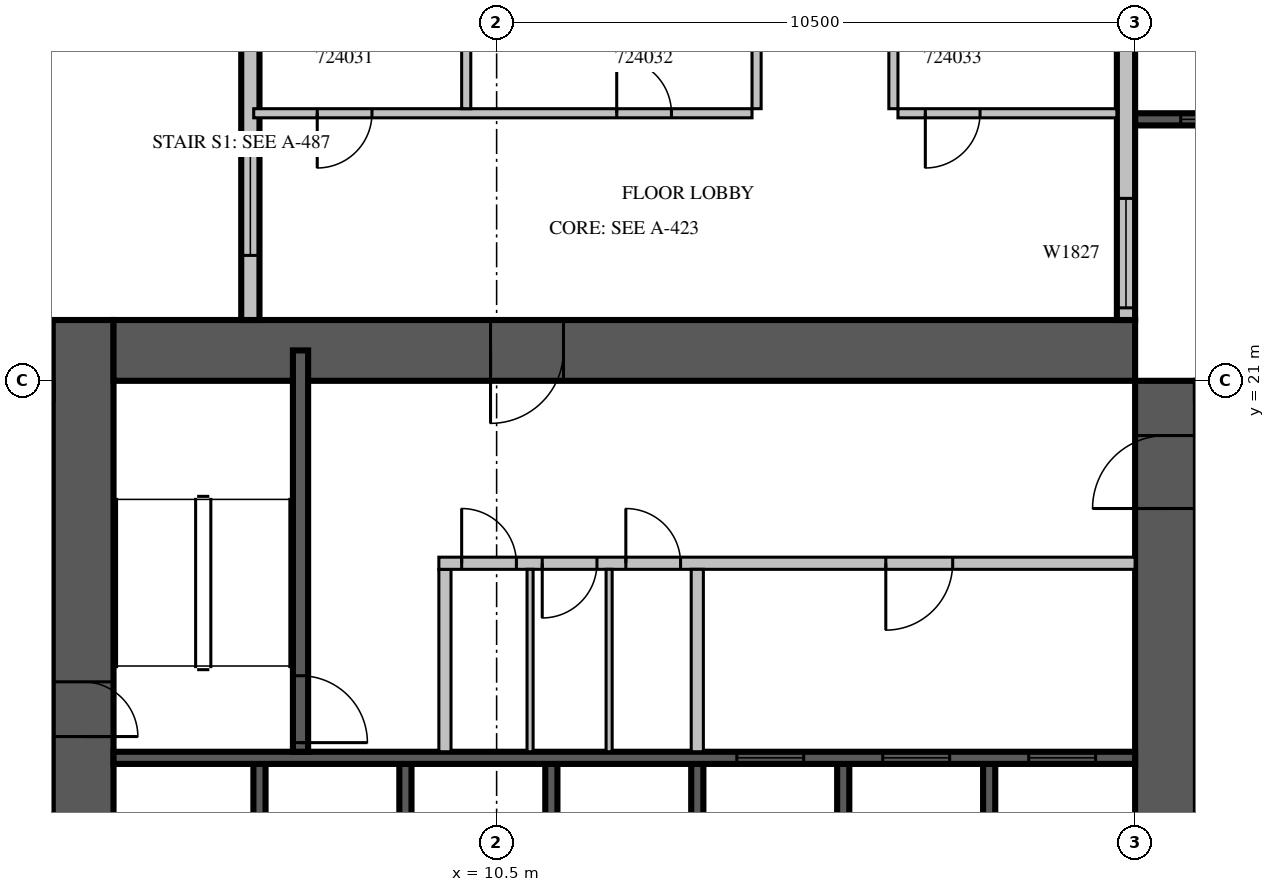
"""IFC4 building model, lengths in metres.
Left out: names, types, materials, properties, quantities, classifications, styles, units other than length and angle.
Written with IfcOpenShell. Run it as: python <this file> out.ifc"""

import sys

from ifc_helpers import new_model, si_unit, direction, frame, frame_2d, origin, place, context, subcontext, project, spatial, rectangle, extrude, source, transform, mapped, element, fill, save


model = new_model("IFC4")
c1 = context("Model", 3, precision=1e-05, world=origin(), true_north=direction((0.0, 1.0)))
c2 = subcontext(c1, "Body", "Model", "MODEL_VIEW")
j1 = project(units=[si_unit("LENGTHUNIT", "METRE"), si_unit("PLANEANGLEUNIT", "RADIAN")], contexts=[c1])
p1 = place(None, origin())
s1 = spatial("IfcSite", under=j1, at=p1, CompositionType="ELEMENT")
p2 = place(p1, origin())
s2 = spatial("IfcBuilding", under=s1, at=p2, CompositionType="ELEMENT")
p3 = place(p2, frame((0.0, 0.0, 111.9)))
s3 = spatial("IfcBuildingStorey", under=s2, at=p3, CompositionType="ELEMENT", Elevation=111.9)
m1 = source(origin(), c2, "Body", "SweptSolid", [
    extrude(rectangle(XDim=17.8, YDim=1.0, at=frame_2d((8.9, 0.0))), origin(), (0.0, 0.0, 1.0), 4.2),
])
p4 = place(p3, frame((3.7, 4.2, 0.0), z_axis=(0.0, 0.0, 1.0), x_axis=(0.0, 1.0, 0.0)))
e1 = element("IfcWall", 1, at=p4, inside=s3, PredefinedType="SHEAR", context=c2, shape_type="MappedRepresentation", body=[
    mapped(m1, transform((0.0, 0.0, 0.0), scale=1.0)),
])
m2 = source(origin(), c2, "Body", "SweptSolid", [
    extrude(rectangle(XDim=2.2, YDim=2.1, at=frame_2d((1.1, 1.05))), frame((0.0, 0.51, 0.0), z_axis=(0.0, -1.0, 0.0), x_axis=(1.0, 0.0, 0.0)), (0.0, 0.0, 1.0), 1.02),
])
p5 = place(p4, frame((4.2, 0.0, 0.0)))
e2 = element("IfcOpeningElement", 2, at=p5, cuts=e1, PredefinedType="OPENING", context=c2, shape_type="MappedRepresentation", body=[
    mapped(m2, transform((0.0, 0.0, 0.0), scale=1.0)),
])
m3 = source(origin(), c2, "Body", "SweptSolid", [
    extrude(rectangle(XDim=0.9, YDim=2.1, at=frame_2d((0.45, 1.05))), frame((0.0, 0.51, 0.0), z_axis=(0.0, -1.0, 0.0), x_axis=(1.0, 0.0, 0.0)), (0.0, 0.0, 1.0), 1.02),
])
p6 = place(p4, frame((10.95, 0.0, 0.0)))
e3 = element("IfcOpeningElement", 3, at=p6, cuts=e1, PredefinedType="OPENING", context=c2, shape_type="MappedRepresentation", body=[
    mapped(m3, transform((0.0, 0.0, 0.0), scale=1.0)),
])
m4 = source(origin(), c2, "Body", "SweptSolid", [
    extrude(rectangle(XDim=16.8, YDim=1.0, at=frame_2d((8.4, 0.0))), origin(), (0.0, 0.0, 1.0), 4.2),
])
p7 = place(p3, frame((21.5, 4.2, 0.0), z_axis=(0.0, 0.0, 1.0), x_axis=(0.0, 1.0, 0.0)))
e4 = element("IfcWall", 4, at=p7, inside=s3, PredefinedType="SHEAR", context=c2, shape_type="MappedRepresentation", body=[
    mapped(m4, transform((0.0, 0.0, 0.0), scale=1.0)),
])
p8 = place(p7, frame((4.2, 0.0, 0.0)))
e5 = element("IfcOpeningElement", 5, at=p8, cuts=e4, PredefinedType="OPENING", context=c2, shape_type="MappedRepresentation", body=[
    mapped(m2, transform((0.0, 0.0, 0.0), scale=1.0)),
])
m5 = source(origin(), c2, "Body", "SweptSolid", [
    extrude(rectangle(XDim=1.2, YDim=2.1, at=frame_2d((0.6, 1.05))), frame((0.0, 0.51, 0.0), z_axis=(0.0, -1.0, 0.0), x_axis=(1.0, 0.0, 0.0)), (0.0, 0.0, 1.0), 1.02),
])
p9 = place(p7, frame((14.7, 0.0, 0.0)))
e6 = element("IfcOpeningElement", 6, at=p9, cuts=e4, PredefinedType="OPENING", context=c2, shape_type="MappedRepresentation", body=[
    mapped(m5, transform((0.0, 0.0, 0.0), scale=1.0)),
])
p10 = place(p3, frame((4.2, 21.5, 0.0), z_axis=(0.0, 0.0, 1.0), x_axis=(1.0, 0.0, 0.0)))
e7 = element("IfcWall", 7, at=p10, inside=s3, PredefinedType="SHEAR", context=c2, shape_type="MappedRepresentation", body=[
    mapped(m4, transform((0.0, 0.0, 0.0), scale=1.0)),
])
p11 = place(p10, frame((6.2, 0.0, 0.0)))
e8 = element("IfcOpeningElement", 8, at=p11, cuts=e7, PredefinedType="OPENING", context=c2, shape_type="MappedRepresentation", body=[
    mapped(m5, transform((0.0, 0.0, 0.0), scale=1.0)),
])
m6 = source(origin(), c2, "Body", "SweptSolid", [
    extrude(rectangle(XDim=3.9, YDim=0.2, at=frame_2d((1.95, 0.0))), origin(), (0.0, 0.0, 1.0), 3.8),
])
p12 = place(p3, frame((21.0, 25.3, 0.0), z_axis=(0.0, 0.0, 1.0), x_axis=(1.0, 0.0, 0.0)))
e9 = element("IfcWall", 9, at=p12, inside=s3, PredefinedType="SOLIDWALL", context=c2, shape_type="MappedRepresentation", body=[
    mapped(m6, transform((0.0, 0.0, 0.0), scale=1.0)),
])
m7 = source(origin(), c2, "Body", "SweptSolid", [
    extrude(rectangle(XDim=2.4, YDim=2.7, at=frame_2d((1.2, 1.35))), frame((0.0, 0.11, 0.0), z_axis=(0.0, -1.0, 0.0), x_axis=(1.0, 0.0, 0.0)), (0.0, 0.0, 1.0), 0.22),
])
p13 = place(p12, frame((0.75, 0.0, 0.6)))
e10 = element("IfcOpeningElement", 10, at=p13, cuts=e9, PredefinedType="OPENING", context=c2, shape_type="MappedRepresentation", body=[
    mapped(m7, transform((0.0, 0.0, 0.0), scale=1.0)),
])
m8 = source(origin(), c2, "Body", "SweptSolid", [
    extrude(rectangle(XDim=6.875, YDim=0.3, at=frame_2d((3.438, 0.0))), origin(), (0.0, 0.0, 1.0), 3.8),
])
p14 = place(p3, frame((20.85, 22.0, 0.0), z_axis=(0.0, 0.0, 1.0), x_axis=(0.0, 1.0, 0.0)))
e11 = element("IfcWall", 11, at=p14, inside=s3, PredefinedType="STANDARD", context=c2, shape_type="MappedRepresentation", body=[
    mapped(m8, transform((0.0, 0.0, 0.0), scale=1.0)),
])
m9 = source(origin(), c2, "Body", "SweptSolid", [
    extrude(rectangle(XDim=1.8, YDim=2.7, at=frame_2d((0.9, 1.35))), frame((0.0, 0.16, 0.0), z_axis=(0.0, -1.0, 0.0), x_axis=(1.0, 0.0, 0.0)), (0.0, 0.0, 1.0), 0.32),
])
p15 = place(p14, frame((0.2, 0.0, 0.6)))
e12 = element("IfcOpeningElement", 12, at=p15, cuts=e11, PredefinedType="OPENING", context=c2, shape_type="MappedRepresentation", body=[
    mapped(m9, transform((0.0, 0.0, 0.0), scale=1.0)),
])
m10 = source(origin(), c2, "Body", "SweptSolid", [
    extrude(rectangle(XDim=1.0, YDim=2.1, at=frame_2d((0.5, 1.05))), frame((0.0, 0.16, 0.0), z_axis=(0.0, -1.0, 0.0), x_axis=(1.0, 0.0, 0.0)), (0.0, 0.0, 1.0), 0.32),
])
p16 = place(p14, frame((4.8, 0.0, 0.0)))
e13 = element("IfcOpeningElement", 13, at=p16, cuts=e11, PredefinedType="OPENING", context=c2, shape_type="MappedRepresentation", body=[
    mapped(m10, transform((0.0, 0.0, 0.0), scale=1.0)),
])
m11 = source(origin(), c2, "Body", "SweptSolid", [
    extrude(rectangle(XDim=16.4, YDim=0.3, at=frame_2d((8.2, 0.0))), origin(), (0.0, 0.0, 1.0), 3.8),
])
p17 = place(p3, frame((6.45, 38.4, 0.0), z_axis=(0.0, 0.0, 1.0), x_axis=(0.0, -1.0, 0.0)))
e14 = element("IfcWall", 14, at=p17, inside=s3, PredefinedType="STANDARD", context=c2, shape_type="MappedRepresentation", body=[
    mapped(m11, transform((0.0, 0.0, 0.0), scale=1.0)),
])
p18 = place(p17, frame((1.15, 0.0, 0.6)))
e15 = element("IfcOpeningElement", 15, at=p18, cuts=e14, PredefinedType="OPENING", context=c2, shape_type="MappedRepresentation", body=[
    mapped(m9, transform((0.0, 0.0, 0.0), scale=1.0)),
])
p19 = place(p17, frame((9.438, 0.0, 0.6)))
e16 = element("IfcOpeningElement", 16, at=p19, cuts=e14, PredefinedType="OPENING", context=c2, shape_type="MappedRepresentation", body=[
    mapped(m9, transform((0.0, 0.0, 0.0), scale=1.0)),
])
p20 = place(p17, frame((13.537, 0.0, 0.6)))
e17 = element("IfcOpeningElement", 17, at=p20, cuts=e14, PredefinedType="OPENING", context=c2, shape_type="MappedRepresentation", body=[
    mapped(m9, transform((0.0, 0.0, 0.0), scale=1.0)),
])
p21 = place(p17, frame((5.908, 0.0, 0.0)))
e18 = element("IfcOpeningElement", 18, at=p21, cuts=e14, PredefinedType="OPENING", context=c2, shape_type="MappedRepresentation", body=[
    mapped(m10, transform((0.0, 0.0, 0.0), scale=1.0)),
])
m12 = source(origin(), c2, "Body", "SweptSolid", [
    extrude(rectangle(XDim=3.0, YDim=0.2, at=frame_2d((1.5, 0.0))), origin(), (0.0, 0.0, 1.0), 4.2),
])
for number, where, z_axis, x_axis in (
    (19, (6.6, 11.7, 0.0), (0.0, 0.0, 1.0), (0.0, 1.0, 0.0)),
    (20, (9.0, 11.7, 0.0), (0.0, 0.0, 1.0), (0.0, 1.0, 0.0)),
    (21, (11.4, 11.7, 0.0), (0.0, 0.0, 1.0), (0.0, 1.0, 0.0)),
    (22, (13.8, 11.7, 0.0), (0.0, 0.0, 1.0), (0.0, 1.0, 0.0)),
    (23, (16.2, 11.7, 0.0), (0.0, 0.0, 1.0), (0.0, 1.0, 0.0)),
    (24, (18.6, 11.7, 0.0), (0.0, 0.0, 1.0), (0.0, 1.0, 0.0)),
):
    element("IfcWall", number, at=place(p3, frame(where, z_axis=z_axis, x_axis=x_axis)), inside=s3, PredefinedType="SOLIDWALL", context=c2, shape_type="MappedRepresentation", body=[
        mapped(m12, transform((0.0, 0.0, 0.0), scale=1.0)),
    ])
m13 = source(origin(), c2, "Body", "SweptSolid", [
    extrude(rectangle(XDim=16.8, YDim=0.2, at=frame_2d((8.4, 0.0))), origin(), (0.0, 0.0, 1.0), 4.2),
])
p22 = place(p3, frame((4.2, 14.8, 0.0), z_axis=(0.0, 0.0, 1.0), x_axis=(1.0, 0.0, 0.0)))
e25 = element("IfcWall", 25, at=p22, inside=s3, PredefinedType="SOLIDWALL", context=c2, shape_type="MappedRepresentation", body=[
    mapped(m13, transform((0.0, 0.0, 0.0), scale=1.0)),
])
m14 = source(origin(), c2, "Body", "SweptSolid", [
    extrude(rectangle(XDim=1.1, YDim=2.1, at=frame_2d((0.55, 1.05))), frame((0.0, 0.11, 0.0), z_axis=(0.0, -1.0, 0.0), x_axis=(1.0, 0.0, 0.0)), (0.0, 0.0, 1.0), 0.22),
])
p23 = place(p22, frame((10.25, 0.0, 0.0)))
e26 = element("IfcOpeningElement", 26, at=p23, cuts=e25, PredefinedType="OPENING", context=c2, shape_type="MappedRepresentation", body=[
    mapped(m14, transform((0.0, 0.0, 0.0), scale=1.0)),
])
p24 = place(p22, frame((12.65, 0.0, 0.0)))
e27 = element("IfcOpeningElement", 27, at=p24, cuts=e25, PredefinedType="OPENING", context=c2, shape_type="MappedRepresentation", body=[
    mapped(m14, transform((0.0, 0.0, 0.0), scale=1.0)),
])
p25 = place(p22, frame((15.05, 0.0, 0.0)))
e28 = element("IfcOpeningElement", 28, at=p25, cuts=e25, PredefinedType="OPENING", context=c2, shape_type="MappedRepresentation", body=[
    mapped(m14, transform((0.0, 0.0, 0.0), scale=1.0)),
])
m15 = source(origin(), c2, "Body", "SweptSolid", [
    extrude(rectangle(XDim=6.6, YDim=0.25, at=frame_2d((3.3, 0.0))), origin(), (0.0, 0.0, 1.0), 3.8),
])
p26 = place(p3, frame((7.275, 14.9, 0.0), z_axis=(0.0, 0.0, 1.0), x_axis=(0.0, 1.0, 0.0)))
e29 = element("IfcWall", 29, at=p26, inside=s3, PredefinedType="SOLIDWALL", context=c2, shape_type="MappedRepresentation", body=[
    mapped(m15, transform((0.0, 0.0, 0.0), scale=1.0)),
])
m16 = source(origin(), c2, "Body", "SweptSolid", [
    extrude(rectangle(XDim=1.1, YDim=2.1, at=frame_2d((0.55, 1.05))), frame((0.0, 0.135, 0.0), z_axis=(0.0, -1.0, 0.0), x_axis=(1.0, 0.0, 0.0)), (0.0, 0.0, 1.0), 0.27),
])
p27 = place(p26, frame((0.15, 0.0, 0.0)))
e30 = element("IfcOpeningElement", 30, at=p27, cuts=e29, PredefinedType="OPENING", context=c2, shape_type="MappedRepresentation", body=[
    mapped(m16, transform((0.0, 0.0, 0.0), scale=1.0)),
])
m17 = source(origin(), c2, "Body", "SweptSolid", [
    extrude(rectangle(XDim=3.0, YDim=0.2, at=frame_2d((1.5, 0.0))), origin(), (0.0, 0.0, 1.0), 3.8),
])
p28 = place(p3, frame((9.65, 14.9, 0.0), z_axis=(0.0, 0.0, 1.0), x_axis=(0.0, 1.0, 0.0)))
e31 = element("IfcWall", 31, at=p28, inside=s3, PredefinedType="PARTITIONING", context=c2, shape_type="MappedRepresentation", body=[
    mapped(m17, transform((0.0, 0.0, 0.0), scale=1.0)),
])
m18 = source(origin(), c2, "Body", "SweptSolid", [
    extrude(rectangle(XDim=11.45, YDim=0.2, at=frame_2d((5.725, 0.0))), origin(), (0.0, 0.0, 1.0), 3.8),
])
p29 = place(p3, frame((9.55, 18.0, 0.0), z_axis=(0.0, 0.0, 1.0), x_axis=(1.0, 0.0, 0.0)))
e32 = element("IfcWall", 32, at=p29, inside=s3, PredefinedType="PARTITIONING", context=c2, shape_type="MappedRepresentation", body=[
    mapped(m18, transform((0.0, 0.0, 0.0), scale=1.0)),
])
m19 = source(origin(), c2, "Body", "SweptSolid", [
    extrude(rectangle(XDim=0.9, YDim=2.1, at=frame_2d((0.45, 1.05))), frame((0.0, 0.11, 0.0), z_axis=(0.0, -1.0, 0.0), x_axis=(1.0, 0.0, 0.0)), (0.0, 0.0, 1.0), 0.22),
])
p30 = place(p29, frame((0.375, 0.0, 0.0)))
e33 = element("IfcOpeningElement", 33, at=p30, cuts=e32, PredefinedType="OPENING", context=c2, shape_type="MappedRepresentation", body=[
    mapped(m19, transform((0.0, 0.0, 0.0), scale=1.0)),
])
p31 = place(p29, frame((1.7, 0.0, 0.0)))
e34 = element("IfcOpeningElement", 34, at=p31, cuts=e32, PredefinedType="OPENING", context=c2, shape_type="MappedRepresentation", body=[
    mapped(m19, transform((0.0, 0.0, 0.0), scale=1.0)),
])
p32 = place(p29, frame((3.075, 0.0, 0.0)))
e35 = element("IfcOpeningElement", 35, at=p32, cuts=e32, PredefinedType="OPENING", context=c2, shape_type="MappedRepresentation", body=[
    mapped(m19, transform((0.0, 0.0, 0.0), scale=1.0)),
])
p33 = place(p29, frame((7.35, 0.0, 0.0)))
e36 = element("IfcOpeningElement", 36, at=p33, cuts=e32, PredefinedType="OPENING", context=c2, shape_type="MappedRepresentation", body=[
    mapped(m14, transform((0.0, 0.0, 0.0), scale=1.0)),
])
p34 = place(p3, frame((13.8, 14.9, 0.0), z_axis=(0.0, 0.0, 1.0), x_axis=(0.0, 1.0, 0.0)))
e37 = element("IfcWall", 37, at=p34, inside=s3, PredefinedType="PARTITIONING", context=c2, shape_type="MappedRepresentation", body=[
    mapped(m17, transform((0.0, 0.0, 0.0), scale=1.0)),
])
m20 = source(origin(), c2, "Body", "SweptSolid", [
    extrude(rectangle(XDim=3.0, YDim=0.1, at=frame_2d((1.5, 0.0))), origin(), (0.0, 0.0, 1.0), 3.8),
])
for number, where, z_axis, x_axis in (
    (38, (11.05, 14.9, 0.0), (0.0, 0.0, 1.0), (0.0, 1.0, 0.0)),
    (39, (12.35, 14.9, 0.0), (0.0, 0.0, 1.0), (0.0, 1.0, 0.0)),
):
    element("IfcWall", number, at=place(p3, frame(where, z_axis=z_axis, x_axis=x_axis)), inside=s3, PredefinedType="PARTITIONING", context=c2, shape_type="MappedRepresentation", body=[
        mapped(m20, transform((0.0, 0.0, 0.0), scale=1.0)),
    ])
m21 = source(origin(), c2, "Body", "SweptSolid", [
    extrude(rectangle(XDim=8.195, YDim=0.15, at=frame_2d((4.098, 0.0))), origin(), (0.0, 0.0, 1.0), 3.8),
])
p35 = place(p3, frame((6.505, 25.4, 0.0), z_axis=(0.0, 0.0, 1.0), x_axis=(1.0, 0.0, 0.0)))
e40 = element("IfcWall", 40, at=p35, inside=s3, PredefinedType="PARTITIONING", context=c2, shape_type="MappedRepresentation", body=[
    mapped(m21, transform((0.0, 0.0, 0.0), scale=1.0)),
])
m22 = source(origin(), c2, "Body", "SweptSolid", [
    extrude(rectangle(XDim=0.9, YDim=2.1, at=frame_2d((0.45, 1.05))), frame((0.0, 0.085, 0.0), z_axis=(0.0, -1.0, 0.0), x_axis=(1.0, 0.0, 0.0)), (0.0, 0.0, 1.0), 0.17),
])
p36 = place(p35, frame((1.045, 0.0, 0.0)))
e41 = element("IfcOpeningElement", 41, at=p36, cuts=e40, PredefinedType="OPENING", context=c2, shape_type="MappedRepresentation", body=[
    mapped(m22, transform((0.0, 0.0, 0.0), scale=1.0)),
])
p37 = place(p35, frame((5.97, 0.0, 0.0)))
e42 = element("IfcOpeningElement", 42, at=p37, cuts=e40, PredefinedType="OPENING", context=c2, shape_type="MappedRepresentation", body=[
    mapped(m22, transform((0.0, 0.0, 0.0), scale=1.0)),
])
m23 = source(origin(), c2, "Body", "SweptSolid", [
    extrude(rectangle(XDim=3.6, YDim=0.15, at=frame_2d((1.8, 0.0))), origin(), (0.0, 0.0, 1.0), 3.8),
])
p38 = place(p3, frame((17.1, 25.4, 0.0), z_axis=(0.0, 0.0, 1.0), x_axis=(1.0, 0.0, 0.0)))
e43 = element("IfcWall", 43, at=p38, inside=s3, PredefinedType="PARTITIONING", context=c2, shape_type="MappedRepresentation", body=[
    mapped(m23, transform((0.0, 0.0, 0.0), scale=1.0)),
])
p39 = place(p38, frame((0.45, 0.0, 0.0)))
e44 = element("IfcOpeningElement", 44, at=p39, cuts=e43, PredefinedType="OPENING", context=c2, shape_type="MappedRepresentation", body=[
    mapped(m22, transform((0.0, 0.0, 0.0), scale=1.0)),
])
m24 = source(origin(), c2, "Body", "SweptSolid", [
    extrude(rectangle(XDim=3.401, YDim=0.15, at=frame_2d((1.7, 0.0))), origin(), (0.0, 0.0, 1.0), 3.8),
])
p40 = place(p3, frame((10.0, 25.475, 0.0), z_axis=(0.0, 0.0, 1.0), x_axis=(0.0, 1.0, 0.0)))
e45 = element("IfcWall", 45, at=p40, inside=s3, PredefinedType="PARTITIONING", context=c2, shape_type="MappedRepresentation", body=[
    mapped(m24, transform((0.0, 0.0, 0.0), scale=1.0)),
])
m25 = source(origin(), c2, "Body", "SweptSolid", [
    extrude(rectangle(XDim=3.85, YDim=0.15, at=frame_2d((1.925, 0.0))), origin(), (0.0, 0.0, 1.0), 3.8),
])
for number, where, z_axis, x_axis in (
    (46, (14.775, 25.475, 0.0), (0.0, 0.0, 1.0), (0.0, 1.0, 0.0)),
    (47, (17.025, 29.325, 0.0), (0.0, 0.0, 1.0), (0.0, -1.0, 0.0)),
):
    element("IfcWall", number, at=place(p3, frame(where, z_axis=z_axis, x_axis=x_axis)), inside=s3, PredefinedType="PARTITIONING", context=c2, shape_type="MappedRepresentation", body=[
        mapped(m25, transform((0.0, 0.0, 0.0), scale=1.0)),
    ])
m26 = source(origin(), c2, "Body", "SweptSolid", [
    extrude(rectangle(XDim=2.4, YDim=2.7, at=frame_2d((1.2, 1.35))), frame((0.0, 0.03, 0.0), z_axis=(0.0, -1.0, 0.0), x_axis=(1.0, 0.0, 0.0)), (0.0, 0.0, 1.0), 0.06),
])
p41 = place(p13, origin())
e48 = element("IfcWindow", 48, at=p41, inside=s3, PartitioningType="SINGLE_PANEL", PredefinedType="WINDOW", context=c2, shape_type="MappedRepresentation", body=[
    mapped(m26, transform((0.0, 0.0, 0.0), scale=1.0)),
])
fill(e10, e48)
m27 = source(origin(), c2, "Body", "SweptSolid", [
    extrude(rectangle(XDim=1.8, YDim=2.7, at=frame_2d((0.9, 1.35))), frame((0.0, 0.03, 0.0), z_axis=(0.0, -1.0, 0.0), x_axis=(1.0, 0.0, 0.0)), (0.0, 0.0, 1.0), 0.06),
])
p42 = place(p15, origin())
e49 = element("IfcWindow", 49, at=p42, inside=s3, PartitioningType="SINGLE_PANEL", PredefinedType="WINDOW", context=c2, shape_type="MappedRepresentation", body=[
    mapped(m27, transform((0.0, 0.0, 0.0), scale=1.0)),
])
fill(e12, e49)
p43 = place(p20, origin())
e50 = element("IfcWindow", 50, at=p43, inside=s3, PartitioningType="SINGLE_PANEL", PredefinedType="WINDOW", context=c2, shape_type="MappedRepresentation", body=[
    mapped(m27, transform((0.0, 0.0, 0.0), scale=1.0)),
])
fill(e17, e50)
m28 = source(origin(), c2, "Body", "SweptSolid", [
    extrude(rectangle(XDim=1.1, YDim=2.1, at=frame_2d((0.55, 1.05))), frame((0.0, 0.025, 0.0), z_axis=(0.0, -1.0, 0.0), x_axis=(1.0, 0.0, 0.0)), (0.0, 0.0, 1.0), 0.05),
])
p44 = place(p23, origin())
e51 = element("IfcDoor", 51, at=p44, inside=s3, OperationType="SLIDING_TO_LEFT", PredefinedType="DOOR", context=c2, shape_type="MappedRepresentation", body=[
    mapped(m28, transform((0.0, 0.0, 0.0), scale=1.0)),
])
fill(e26, e51)
p45 = place(p24, origin())
e52 = element("IfcDoor", 52, at=p45, inside=s3, OperationType="SLIDING_TO_LEFT", PredefinedType="DOOR", context=c2, shape_type="MappedRepresentation", body=[
    mapped(m28, transform((0.0, 0.0, 0.0), scale=1.0)),
])
fill(e27, e52)
p46 = place(p25, origin())
e53 = element("IfcDoor", 53, at=p46, inside=s3, OperationType="SLIDING_TO_LEFT", PredefinedType="DOOR", context=c2, shape_type="MappedRepresentation", body=[
    mapped(m28, transform((0.0, 0.0, 0.0), scale=1.0)),
])
fill(e28, e53)
p47 = place(p27, origin())
e54 = element("IfcDoor", 54, at=p47, inside=s3, OperationType="SINGLE_SWING_RIGHT", PredefinedType="DOOR", context=c2, shape_type="MappedRepresentation", body=[
    mapped(m28, transform((0.0, 0.0, 0.0), scale=1.0)),
])
fill(e30, e54)
m29 = source(origin(), c2, "Body", "SweptSolid", [
    extrude(rectangle(XDim=0.9, YDim=2.1, at=frame_2d((0.45, 1.05))), frame((0.0, 0.025, 0.0), z_axis=(0.0, -1.0, 0.0), x_axis=(1.0, 0.0, 0.0)), (0.0, 0.0, 1.0), 0.05),
])
p48 = place(p30, origin())
e55 = element("IfcDoor", 55, at=p48, inside=s3, OperationType="SINGLE_SWING_LEFT", PredefinedType="DOOR", context=c2, shape_type="MappedRepresentation", body=[
    mapped(m29, transform((0.0, 0.0, 0.0), scale=1.0)),
])
fill(e33, e55)
p49 = place(p31, origin())
e56 = element("IfcDoor", 56, at=p49, inside=s3, OperationType="SINGLE_SWING_RIGHT", PredefinedType="DOOR", context=c2, shape_type="MappedRepresentation", body=[
    mapped(m29, transform((0.0, 0.0, 0.0), scale=1.0)),
])
fill(e34, e56)
p50 = place(p32, origin())
e57 = element("IfcDoor", 57, at=p50, inside=s3, OperationType="SINGLE_SWING_LEFT", PredefinedType="DOOR", context=c2, shape_type="MappedRepresentation", body=[
    mapped(m29, transform((0.0, 0.0, 0.0), scale=1.0)),
])
fill(e35, e57)
p51 = place(p33, origin())
e58 = element("IfcDoor", 58, at=p51, inside=s3, OperationType="SINGLE_SWING_RIGHT", PredefinedType="DOOR", context=c2, shape_type="MappedRepresentation", body=[
    mapped(m28, transform((0.0, 0.0, 0.0), scale=1.0)),
])
fill(e36, e58)
m30 = source(origin(), c2, "Body", "SweptSolid", [
    extrude(rectangle(XDim=1.2, YDim=2.1, at=frame_2d((0.6, 1.05))), frame((0.0, 0.025, 0.0), z_axis=(0.0, -1.0, 0.0), x_axis=(1.0, 0.0, 0.0)), (0.0, 0.0, 1.0), 0.05),
])
p52 = place(p11, origin())
e59 = element("IfcDoor", 59, at=p52, inside=s3, OperationType="SINGLE_SWING_RIGHT", PredefinedType="DOOR", context=c2, shape_type="MappedRepresentation", body=[
    mapped(m30, transform((0.0, 0.0, 0.0), scale=1.0)),
])
fill(e8, e59)
p53 = place(p9, origin())
e60 = element("IfcDoor", 60, at=p53, inside=s3, OperationType="SINGLE_SWING_LEFT", PredefinedType="DOOR", context=c2, shape_type="MappedRepresentation", body=[
    mapped(m30, transform((0.0, 0.0, 0.0), scale=1.0)),
])
fill(e6, e60)
p54 = place(p6, origin())
e61 = element("IfcDoor", 61, at=p54, inside=s3, OperationType="SINGLE_SWING_RIGHT", PredefinedType="DOOR", context=c2, shape_type="MappedRepresentation", body=[
    mapped(m29, transform((0.0, 0.0, 0.0), scale=1.0)),
])
fill(e3, e61)
p55 = place(p36, origin())
e62 = element("IfcDoor", 62, at=p55, inside=s3, OperationType="SINGLE_SWING_RIGHT", PredefinedType="DOOR", context=c2, shape_type="MappedRepresentation", body=[
    mapped(m29, transform((0.0, 0.0, 0.0), scale=1.0)),
])
fill(e41, e62)
p56 = place(p37, origin())
e63 = element("IfcDoor", 63, at=p56, inside=s3, OperationType="SINGLE_SWING_LEFT", PredefinedType="DOOR", context=c2, shape_type="MappedRepresentation", body=[
    mapped(m29, transform((0.0, 0.0, 0.0), scale=1.0)),
])
fill(e42, e63)
p57 = place(p39, origin())
e64 = element("IfcDoor", 64, at=p57, inside=s3, OperationType="SINGLE_SWING_RIGHT", PredefinedType="DOOR", context=c2, shape_type="MappedRepresentation", body=[
    mapped(m29, transform((0.0, 0.0, 0.0), scale=1.0)),
])
fill(e44, e64)
save(model, sys.argv[1])
